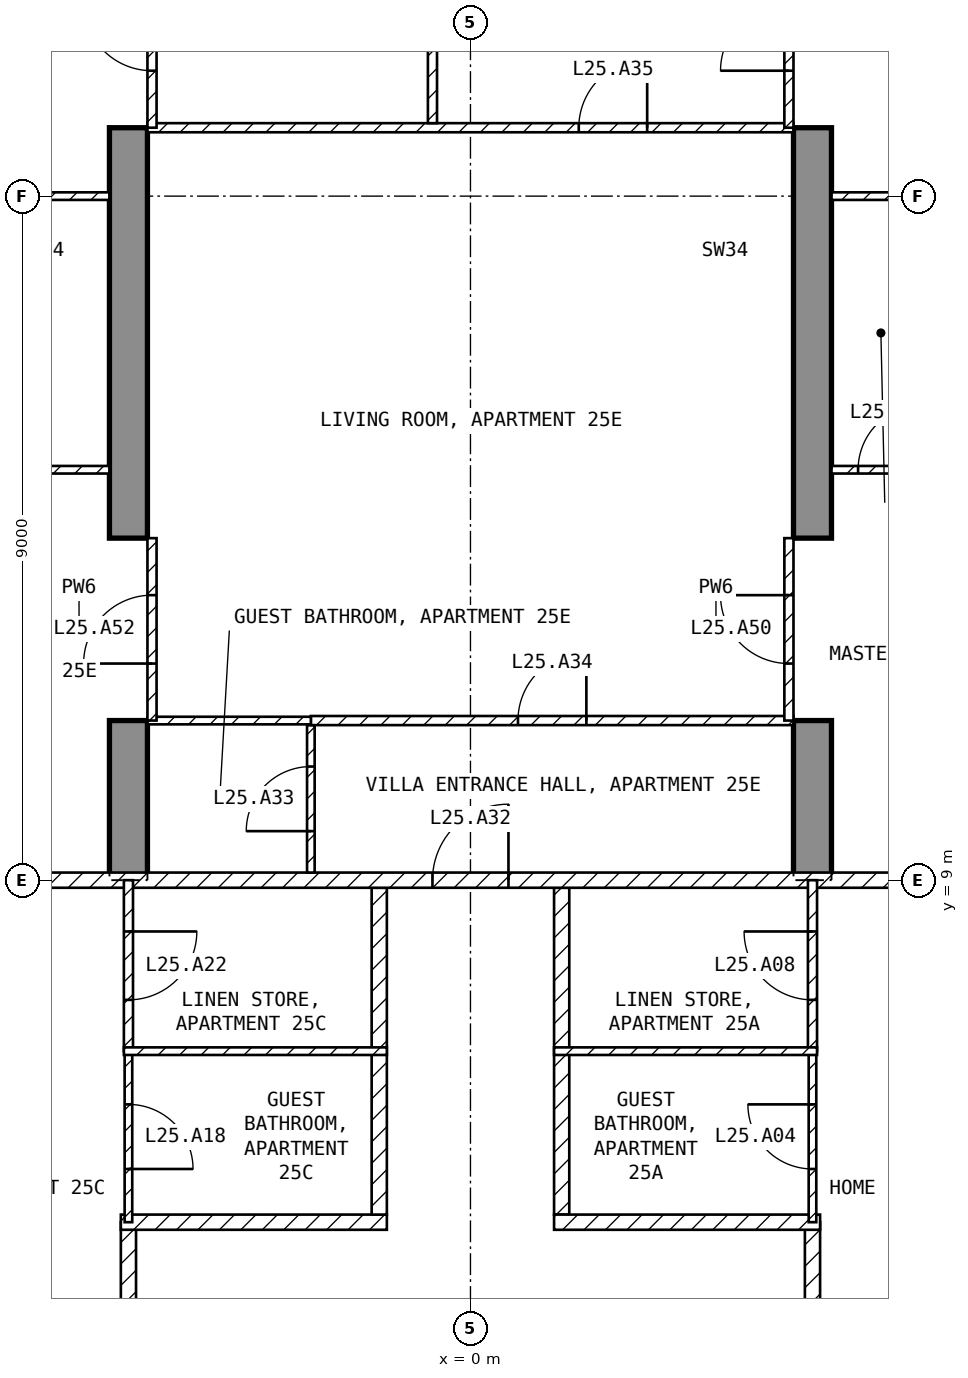
"""IFC4 building model, lengths in metres.
Left out: names, types, materials, properties, quantities, classifications, styles, units other than length and angle.
Written with IfcOpenShell. Run it as: python <this file> out.ifc"""

import sys

from ifc_helpers import new_model, si_unit, direction, frame, frame_2d, origin, place, context, subcontext, project, spatial, polyline, rectangle, outline, extrude, element, fill, save


model = new_model("IFC4")
c1 = context("Model", 3, precision=1e-05, world=origin(), true_north=direction((0.0, 1.0)))
c2 = subcontext(c1, "Body", "Model", "MODEL_VIEW")
j1 = project(units=[si_unit("LENGTHUNIT", "METRE"), si_unit("PLANEANGLEUNIT", "RADIAN")], contexts=[c1])
p1 = place(None, origin())
s1 = spatial("IfcSite", under=j1, at=p1, CompositionType="ELEMENT")
p2 = place(p1, origin())
s2 = spatial("IfcBuilding", under=s1, at=p2, CompositionType="ELEMENT")
p3 = place(p2, frame((0.0, 0.0, 109.4)))
s3 = spatial("IfcBuildingStorey", under=s2, at=p3, CompositionType="ELEMENT", Elevation=109.4)
for number, where, z_axis, x_axis in (
    (1, (-4.75, 9.0, -0.25), (1.0, 0.0, 0.0), (0.0, 1.0, 0.0)),
    (2, (4.25, 9.0, -0.25), (1.0, 0.0, 0.0), (0.0, 1.0, 0.0)),
):
    element("IfcWall", number, at=place(p3, frame(where, z_axis=z_axis, x_axis=x_axis)), inside=s3, PredefinedType="SHEAR", context=c2, shape_type="SweptSolid", body=[
        extrude(outline(polyline([(0.0, 0.0), (2.1, 0.0), (2.1, 2.65), (4.5, 2.65), (4.5, 0.0), (9.9, 0.0), (9.9, 2.65), (12.3, 2.65), (12.3, 0.0), (16.55, 0.0), (16.55, 3.5), (0.0, 3.5), (0.0, 0.0)])), origin(), (0.0, 0.0, 1.0), 0.5),
    ])
p4 = place(p3, frame((4.5, 4.5, 0.0), z_axis=(0.0, 0.0, 1.0), x_axis=(0.0, -1.0, 0.0)))
e3 = element("IfcWall", 3, at=p4, inside=s3, PredefinedType="PARTITIONING", context=c2, shape_type="SweptSolid", body=[
    extrude(rectangle(XDim=3.2, YDim=0.2, at=frame_2d((1.6, 0.0))), origin(), (0.0, 0.0, 1.0), 3.25),
])
p5 = place(p3, frame((1.2, 8.9, 0.0), z_axis=(0.0, 0.0, 1.0), x_axis=(0.0, -1.0, 0.0)))
e4 = element("IfcWall", 4, at=p5, inside=s3, PredefinedType="PARTITIONING", context=c2, shape_type="SweptSolid", body=[
    extrude(rectangle(XDim=4.3, YDim=0.2, at=frame_2d((2.15, 0.0))), origin(), (0.0, 0.0, 1.0), 3.25),
])
p6 = place(p3, frame((1.1, 4.5, 0.0), z_axis=(0.0, 0.0, 1.0), x_axis=(1.0, 0.0, 0.0)))
e5 = element("IfcWall", 5, at=p6, inside=s3, PredefinedType="PARTITIONING", context=c2, shape_type="SweptSolid", body=[
    extrude(rectangle(XDim=3.5, YDim=0.2, at=frame_2d((1.75, 0.0))), origin(), (0.0, 0.0, 1.0), 3.25),
])
p7 = place(p3, frame((-4.5, 1.3, 0.0), z_axis=(0.0, 0.0, 1.0), x_axis=(0.0, 1.0, 0.0)))
e6 = element("IfcWall", 6, at=p7, inside=s3, PredefinedType="PARTITIONING", context=c2, shape_type="SweptSolid", body=[
    extrude(rectangle(XDim=3.2, YDim=0.2, at=frame_2d((1.6, 0.0))), origin(), (0.0, 0.0, 1.0), 3.25),
])
p8 = place(p3, frame((-4.6, 4.5, 0.0), z_axis=(0.0, 0.0, 1.0), x_axis=(1.0, 0.0, 0.0)))
e7 = element("IfcWall", 7, at=p8, inside=s3, PredefinedType="PARTITIONING", context=c2, shape_type="SweptSolid", body=[
    extrude(rectangle(XDim=3.5, YDim=0.2, at=frame_2d((1.75, 0.0))), origin(), (0.0, 0.0, 1.0), 3.25),
])
p9 = place(p3, frame((-1.2, 4.6, 0.0), z_axis=(0.0, 0.0, 1.0), x_axis=(0.0, 1.0, 0.0)))
e8 = element("IfcWall", 8, at=p9, inside=s3, PredefinedType="PARTITIONING", context=c2, shape_type="SweptSolid", body=[
    extrude(rectangle(XDim=4.3, YDim=0.2, at=frame_2d((2.15, 0.0))), origin(), (0.0, 0.0, 1.0), 3.25),
])
p10 = place(p3, frame((-8.92, 9.0, 0.0), z_axis=(0.0, 0.0, 1.0), x_axis=(1.0, 0.0, 0.0)))
e9 = element("IfcWall", 9, at=p10, inside=s3, PredefinedType="PARTITIONING", context=c2, shape_type="SweptSolid", body=[
    extrude(rectangle(XDim=17.84, YDim=0.2, at=frame_2d((8.92, 0.0))), origin(), (0.0, 0.0, 1.0), 3.25),
])
p11 = place(p10, frame((8.42, 0.0, 0.0)))
e10 = element("IfcOpeningElement", 10, at=p11, cuts=e9, PredefinedType="OPENING", context=c2, shape_type="SweptSolid", body=[
    extrude(rectangle(XDim=1.0, YDim=2.1, at=frame_2d((0.5, 1.05))), frame((0.0, 0.11, 0.0), z_axis=(0.0, -1.0, 0.0), x_axis=(1.0, 0.0, 0.0)), (0.0, 0.0, 1.0), 0.22),
])
p12 = place(p3, frame((4.5, 4.5, 0.0), z_axis=(0.0, 0.0, 1.0), x_axis=(0.0, 1.0, 0.0)))
e11 = element("IfcWall", 11, at=p12, inside=s3, PredefinedType="PARTITIONING", context=c2, shape_type="SweptSolid", body=[
    extrude(rectangle(XDim=2.25, YDim=0.1, at=frame_2d((1.125, 0.0))), origin(), (0.0, 0.0, 1.0), 3.25),
])
p13 = place(p12, frame((0.7, 0.0, 0.0)))
e12 = element("IfcOpeningElement", 12, at=p13, cuts=e11, PredefinedType="OPENING", context=c2, shape_type="SweptSolid", body=[
    extrude(rectangle(XDim=0.85, YDim=2.1, at=frame_2d((0.425, 1.05))), frame((0.0, 0.06, 0.0), z_axis=(0.0, -1.0, 0.0), x_axis=(1.0, 0.0, 0.0)), (0.0, 0.0, 1.0), 0.12),
])
p14 = place(p3, frame((4.5, 6.75, 0.0), z_axis=(0.0, 0.0, 1.0), x_axis=(0.0, 1.0, 0.0)))
e13 = element("IfcWall", 13, at=p14, inside=s3, PredefinedType="PARTITIONING", context=c2, shape_type="SweptSolid", body=[
    extrude(rectangle(XDim=2.25, YDim=0.12, at=frame_2d((1.125, 0.0))), origin(), (0.0, 0.0, 1.0), 3.25),
])
p15 = place(p14, frame((0.675, 0.0, 0.0)))
e14 = element("IfcOpeningElement", 14, at=p15, cuts=e13, PredefinedType="OPENING", context=c2, shape_type="SweptSolid", body=[
    extrude(rectangle(XDim=0.9, YDim=2.1, at=frame_2d((0.45, 1.05))), frame((0.0, 0.07, 0.0), z_axis=(0.0, -1.0, 0.0), x_axis=(1.0, 0.0, 0.0)), (0.0, 0.0, 1.0), 0.14),
])
p16 = place(p3, frame((1.1, 6.75, 0.0), z_axis=(0.0, 0.0, 1.0), x_axis=(1.0, 0.0, 0.0)))
e15 = element("IfcWall", 15, at=p16, inside=s3, PredefinedType="PARTITIONING", context=c2, shape_type="SweptSolid", body=[
    extrude(rectangle(XDim=3.46, YDim=0.1, at=frame_2d((1.73, 0.0))), origin(), (0.0, 0.0, 1.0), 3.25),
])
p17 = place(p3, frame((-4.5, 6.75, 0.0), z_axis=(0.0, 0.0, 1.0), x_axis=(0.0, -1.0, 0.0)))
e16 = element("IfcWall", 16, at=p17, inside=s3, PredefinedType="PARTITIONING", context=c2, shape_type="SweptSolid", body=[
    extrude(rectangle(XDim=2.25, YDim=0.1, at=frame_2d((1.125, 0.0))), origin(), (0.0, 0.0, 1.0), 3.25),
])
p18 = place(p17, frame((0.7, 0.0, 0.0)))
e17 = element("IfcOpeningElement", 17, at=p18, cuts=e16, PredefinedType="OPENING", context=c2, shape_type="SweptSolid", body=[
    extrude(rectangle(XDim=0.85, YDim=2.1, at=frame_2d((0.425, 1.05))), frame((0.0, 0.06, 0.0), z_axis=(0.0, -1.0, 0.0), x_axis=(1.0, 0.0, 0.0)), (0.0, 0.0, 1.0), 0.12),
])
p19 = place(p3, frame((-4.5, 9.0, 0.0), z_axis=(0.0, 0.0, 1.0), x_axis=(0.0, -1.0, 0.0)))
e18 = element("IfcWall", 18, at=p19, inside=s3, PredefinedType="PARTITIONING", context=c2, shape_type="SweptSolid", body=[
    extrude(rectangle(XDim=2.25, YDim=0.12, at=frame_2d((1.125, 0.0))), origin(), (0.0, 0.0, 1.0), 3.25),
])
p20 = place(p19, frame((0.675, 0.0, 0.0)))
e19 = element("IfcOpeningElement", 19, at=p20, cuts=e18, PredefinedType="OPENING", context=c2, shape_type="SweptSolid", body=[
    extrude(rectangle(XDim=0.9, YDim=2.1, at=frame_2d((0.45, 1.05))), frame((0.0, 0.07, 0.0), z_axis=(0.0, -1.0, 0.0), x_axis=(1.0, 0.0, 0.0)), (0.0, 0.0, 1.0), 0.14),
])
p21 = place(p3, frame((-4.56, 6.75, 0.0), z_axis=(0.0, 0.0, 1.0), x_axis=(1.0, 0.0, 0.0)))
e20 = element("IfcWall", 20, at=p21, inside=s3, PredefinedType="PARTITIONING", context=c2, shape_type="SweptSolid", body=[
    extrude(rectangle(XDim=3.46, YDim=0.1, at=frame_2d((1.73, 0.0))), origin(), (0.0, 0.0, 1.0), 3.25),
])
p22 = place(p3, frame((-2.1, 9.1, 0.0), z_axis=(0.0, 0.0, 1.0), x_axis=(0.0, 1.0, 0.0)))
e21 = element("IfcWall", 21, at=p22, inside=s3, PredefinedType="PARTITIONING", context=c2, shape_type="SweptSolid", body=[
    extrude(rectangle(XDim=1.94, YDim=0.1, at=frame_2d((0.97, 0.0))), origin(), (0.0, 0.0, 1.0), 3.25),
])
p23 = place(p22, frame((0.545, 0.0, 0.0)))
e22 = element("IfcOpeningElement", 22, at=p23, cuts=e21, PredefinedType="OPENING", context=c2, shape_type="SweptSolid", body=[
    extrude(rectangle(XDim=0.85, YDim=2.1, at=frame_2d((0.425, 1.05))), frame((0.0, 0.06, 0.0), z_axis=(0.0, -1.0, 0.0), x_axis=(1.0, 0.0, 0.0)), (0.0, 0.0, 1.0), 0.12),
])
p24 = place(p3, frame((-2.1, 11.1, 0.0), z_axis=(0.0, 0.0, 1.0), x_axis=(1.0, 0.0, 0.0)))
e23 = element("IfcWall", 23, at=p24, inside=s3, PredefinedType="PARTITIONING", context=c2, shape_type="SweptSolid", body=[
    extrude(rectangle(XDim=6.35, YDim=0.12, at=frame_2d((3.175, 0.0))), origin(), (0.0, 0.0, 1.0), 3.25),
])
p25 = place(p24, frame((2.725, 0.0, 0.0)))
e24 = element("IfcOpeningElement", 24, at=p25, cuts=e23, PredefinedType="OPENING", context=c2, shape_type="SweptSolid", body=[
    extrude(rectangle(XDim=0.9, YDim=2.1, at=frame_2d((0.45, 1.05))), frame((0.0, 0.07, 0.0), z_axis=(0.0, -1.0, 0.0), x_axis=(1.0, 0.0, 0.0)), (0.0, 0.0, 1.0), 0.14),
])
p26 = place(p3, frame((-4.25, 11.1, 0.0), z_axis=(0.0, 0.0, 1.0), x_axis=(1.0, 0.0, 0.0)))
e25 = element("IfcWall", 25, at=p26, inside=s3, PredefinedType="PARTITIONING", context=c2, shape_type="SweptSolid", body=[
    extrude(rectangle(XDim=2.15, YDim=0.1, at=frame_2d((1.075, 0.0))), origin(), (0.0, 0.0, 1.0), 3.25),
])
p27 = place(p3, frame((-4.25, 18.9, 0.0), z_axis=(0.0, 0.0, 1.0), x_axis=(1.0, 0.0, 0.0)))
e26 = element("IfcWall", 26, at=p27, inside=s3, PredefinedType="PARTITIONING", context=c2, shape_type="SweptSolid", body=[
    extrude(rectangle(XDim=8.5, YDim=0.12, at=frame_2d((4.25, 0.0))), origin(), (0.0, 0.0, 1.0), 3.25),
])
p28 = place(p27, frame((5.675, 0.0, 0.0)))
e27 = element("IfcOpeningElement", 27, at=p28, cuts=e26, PredefinedType="OPENING", context=c2, shape_type="SweptSolid", body=[
    extrude(rectangle(XDim=0.9, YDim=2.1, at=frame_2d((0.45, 1.05))), frame((0.0, 0.07, 0.0), z_axis=(0.0, -1.0, 0.0), x_axis=(1.0, 0.0, 0.0)), (0.0, 0.0, 1.0), 0.14),
])
p29 = place(p3, frame((-0.5, 18.96, 0.0), z_axis=(0.0, 0.0, 1.0), x_axis=(0.0, 1.0, 0.0)))
e28 = element("IfcWall", 28, at=p29, inside=s3, PredefinedType="PARTITIONING", context=c2, shape_type="SweptSolid", body=[
    extrude(rectangle(XDim=4.38, YDim=0.12, at=frame_2d((2.19, 0.0))), origin(), (0.0, 0.0, 1.0), 3.25),
])
p30 = place(p29, frame((1.74, 0.0, 0.0)))
e29 = element("IfcOpeningElement", 29, at=p30, cuts=e28, PredefinedType="OPENING", context=c2, shape_type="SweptSolid", body=[
    extrude(rectangle(XDim=0.9, YDim=2.1, at=frame_2d((0.45, 1.05))), frame((0.0, 0.07, 0.0), z_axis=(0.0, -1.0, 0.0), x_axis=(1.0, 0.0, 0.0)), (0.0, 0.0, 1.0), 0.14),
])
p31 = place(p3, frame((4.75, 14.4, 0.0), z_axis=(0.0, 0.0, 1.0), x_axis=(1.0, 0.0, 0.0)))
e30 = element("IfcWall", 30, at=p31, inside=s3, PredefinedType="PARTITIONING", context=c2, shape_type="SweptSolid", body=[
    extrude(rectangle(XDim=1.6, YDim=0.1, at=frame_2d((0.8, 0.0))), origin(), (0.0, 0.0, 1.0), 3.25),
])
p32 = place(p31, frame((0.35, 0.0, 0.0)))
e31 = element("IfcOpeningElement", 31, at=p32, cuts=e30, PredefinedType="OPENING", context=c2, shape_type="SweptSolid", body=[
    extrude(rectangle(XDim=0.85, YDim=2.1, at=frame_2d((0.425, 1.05))), frame((0.0, 0.06, 0.0), z_axis=(0.0, -1.0, 0.0), x_axis=(1.0, 0.0, 0.0)), (0.0, 0.0, 1.0), 0.12),
])
p33 = place(p3, frame((4.75, 18.0, 0.0), z_axis=(0.0, 0.0, 1.0), x_axis=(1.0, 0.0, 0.0)))
e32 = element("IfcWall", 32, at=p33, inside=s3, PredefinedType="PARTITIONING", context=c2, shape_type="SweptSolid", body=[
    extrude(rectangle(XDim=1.55, YDim=0.1, at=frame_2d((0.775, 0.0))), origin(), (0.0, 0.0, 1.0), 2.414),
])
p34 = place(p3, frame((-6.95, 14.4, 0.0), z_axis=(0.0, 0.0, 1.0), x_axis=(1.0, 0.0, 0.0)))
e33 = element("IfcWall", 33, at=p34, inside=s3, PredefinedType="PARTITIONING", context=c2, shape_type="SweptSolid", body=[
    extrude(rectangle(XDim=2.2, YDim=0.1, at=frame_2d((1.1, 0.0))), origin(), (0.0, 0.0, 1.0), 3.25),
])
p35 = place(p3, frame((-6.9, 18.0, 0.0), z_axis=(0.0, 0.0, 1.0), x_axis=(1.0, 0.0, 0.0)))
e34 = element("IfcWall", 34, at=p35, inside=s3, PredefinedType="PARTITIONING", context=c2, shape_type="SweptSolid", body=[
    extrude(rectangle(XDim=2.15, YDim=0.1, at=frame_2d((1.075, 0.0))), origin(), (0.0, 0.0, 1.0), 2.414),
])
p36 = place(p3, frame((4.19, 11.1, 0.0), z_axis=(0.0, 0.0, 1.0), x_axis=(0.0, 1.0, 0.0)))
e35 = element("IfcWall", 35, at=p36, inside=s3, PredefinedType="PARTITIONING", context=c2, shape_type="SweptSolid", body=[
    extrude(rectangle(XDim=2.4, YDim=0.12, at=frame_2d((1.2, 0.0))), origin(), (0.0, 0.0, 1.0), 2.4),
])
p37 = place(p36, frame((0.75, 0.0, 0.0)))
e36 = element("IfcOpeningElement", 36, at=p37, cuts=e35, PredefinedType="OPENING", context=c2, shape_type="SweptSolid", body=[
    extrude(rectangle(XDim=0.9, YDim=2.1, at=frame_2d((0.45, 1.05))), frame((0.0, 0.07, 0.0), z_axis=(0.0, -1.0, 0.0), x_axis=(1.0, 0.0, 0.0)), (0.0, 0.0, 1.0), 0.14),
])
p38 = place(p3, frame((4.19, 18.9, 0.0), z_axis=(0.0, 0.0, 1.0), x_axis=(0.0, 1.0, 0.0)))
e37 = element("IfcWall", 37, at=p38, inside=s3, PredefinedType="PARTITIONING", context=c2, shape_type="SweptSolid", body=[
    extrude(rectangle(XDim=2.4, YDim=0.12, at=frame_2d((1.2, 0.0))), origin(), (0.0, 0.0, 1.0), 2.4),
])
p39 = place(p38, frame((0.75, 0.0, 0.0)))
e38 = element("IfcOpeningElement", 38, at=p39, cuts=e37, PredefinedType="OPENING", context=c2, shape_type="SweptSolid", body=[
    extrude(rectangle(XDim=0.9, YDim=2.1, at=frame_2d((0.45, 1.05))), frame((0.0, 0.07, 0.0), z_axis=(0.0, -1.0, 0.0), x_axis=(1.0, 0.0, 0.0)), (0.0, 0.0, 1.0), 0.14),
])
p40 = place(p3, frame((-4.19, 11.1, 0.0), z_axis=(0.0, 0.0, 1.0), x_axis=(0.0, 1.0, 0.0)))
e39 = element("IfcWall", 39, at=p40, inside=s3, PredefinedType="PARTITIONING", context=c2, shape_type="SweptSolid", body=[
    extrude(rectangle(XDim=2.4, YDim=0.12, at=frame_2d((1.2, 0.0))), origin(), (0.0, 0.0, 1.0), 2.4),
])
p41 = place(p40, frame((0.75, 0.0, 0.0)))
e40 = element("IfcOpeningElement", 40, at=p41, cuts=e39, PredefinedType="OPENING", context=c2, shape_type="SweptSolid", body=[
    extrude(rectangle(XDim=0.9, YDim=2.1, at=frame_2d((0.45, 1.05))), frame((0.0, 0.07, 0.0), z_axis=(0.0, -1.0, 0.0), x_axis=(1.0, 0.0, 0.0)), (0.0, 0.0, 1.0), 0.14),
])
p42 = place(p3, frame((-4.19, 18.9, 0.0), z_axis=(0.0, 0.0, 1.0), x_axis=(0.0, 1.0, 0.0)))
e41 = element("IfcWall", 41, at=p42, inside=s3, PredefinedType="PARTITIONING", context=c2, shape_type="SweptSolid", body=[
    extrude(rectangle(XDim=2.4, YDim=0.12, at=frame_2d((1.2, 0.0))), origin(), (0.0, 0.0, 1.0), 2.4),
])
p43 = place(p42, frame((0.75, 0.0, 0.0)))
e42 = element("IfcOpeningElement", 42, at=p43, cuts=e41, PredefinedType="OPENING", context=c2, shape_type="SweptSolid", body=[
    extrude(rectangle(XDim=0.9, YDim=2.1, at=frame_2d((0.45, 1.05))), frame((0.0, 0.07, 0.0), z_axis=(0.0, -1.0, 0.0), x_axis=(1.0, 0.0, 0.0)), (0.0, 0.0, 1.0), 0.14),
])
p44 = place(p13, origin())
e43 = element("IfcDoor", 43, at=p44, inside=s3, OperationType="SINGLE_SWING_RIGHT", PredefinedType="DOOR", context=c2, shape_type="SweptSolid", body=[
    extrude(rectangle(XDim=0.85, YDim=2.1, at=frame_2d((0.425, 1.05))), frame((0.0, 0.025, 0.0), z_axis=(0.0, -1.0, 0.0), x_axis=(1.0, 0.0, 0.0)), (0.0, 0.0, 1.0), 0.05),
])
fill(e12, e43)
p45 = place(p15, origin())
e44 = element("IfcDoor", 44, at=p45, inside=s3, OperationType="SINGLE_SWING_RIGHT", PredefinedType="DOOR", context=c2, shape_type="SweptSolid", body=[
    extrude(rectangle(XDim=0.9, YDim=2.1, at=frame_2d((0.45, 1.05))), frame((0.0, 0.025, 0.0), z_axis=(0.0, -1.0, 0.0), x_axis=(1.0, 0.0, 0.0)), (0.0, 0.0, 1.0), 0.05),
])
fill(e14, e44)
p46 = place(p18, origin())
e45 = element("IfcDoor", 45, at=p46, inside=s3, OperationType="SINGLE_SWING_RIGHT", PredefinedType="DOOR", context=c2, shape_type="SweptSolid", body=[
    extrude(rectangle(XDim=0.85, YDim=2.1, at=frame_2d((0.425, 1.05))), frame((0.0, 0.025, 0.0), z_axis=(0.0, -1.0, 0.0), x_axis=(1.0, 0.0, 0.0)), (0.0, 0.0, 1.0), 0.05),
])
fill(e17, e45)
p47 = place(p20, origin())
e46 = element("IfcDoor", 46, at=p47, inside=s3, OperationType="SINGLE_SWING_LEFT", PredefinedType="DOOR", context=c2, shape_type="SweptSolid", body=[
    extrude(rectangle(XDim=0.9, YDim=2.1, at=frame_2d((0.45, 1.05))), frame((0.0, 0.025, 0.0), z_axis=(0.0, -1.0, 0.0), x_axis=(1.0, 0.0, 0.0)), (0.0, 0.0, 1.0), 0.05),
])
fill(e19, e46)
p48 = place(p11, origin())
e47 = element("IfcDoor", 47, at=p48, inside=s3, OperationType="SINGLE_SWING_RIGHT", PredefinedType="DOOR", context=c2, shape_type="SweptSolid", body=[
    extrude(rectangle(XDim=1.0, YDim=2.1, at=frame_2d((0.5, 1.05))), frame((0.0, 0.025, 0.0), z_axis=(0.0, -1.0, 0.0), x_axis=(1.0, 0.0, 0.0)), (0.0, 0.0, 1.0), 0.05),
])
fill(e10, e47)
p49 = place(p23, origin())
e48 = element("IfcDoor", 48, at=p49, inside=s3, OperationType="SINGLE_SWING_LEFT", PredefinedType="DOOR", context=c2, shape_type="SweptSolid", body=[
    extrude(rectangle(XDim=0.85, YDim=2.1, at=frame_2d((0.425, 1.05))), frame((0.0, 0.025, 0.0), z_axis=(0.0, -1.0, 0.0), x_axis=(1.0, 0.0, 0.0)), (0.0, 0.0, 1.0), 0.05),
])
fill(e22, e48)
p50 = place(p25, origin())
e49 = element("IfcDoor", 49, at=p50, inside=s3, OperationType="SINGLE_SWING_RIGHT", PredefinedType="DOOR", context=c2, shape_type="SweptSolid", body=[
    extrude(rectangle(XDim=0.9, YDim=2.1, at=frame_2d((0.45, 1.05))), frame((0.0, 0.025, 0.0), z_axis=(0.0, -1.0, 0.0), x_axis=(1.0, 0.0, 0.0)), (0.0, 0.0, 1.0), 0.05),
])
fill(e24, e49)
p51 = place(p28, origin())
e50 = element("IfcDoor", 50, at=p51, inside=s3, OperationType="SINGLE_SWING_RIGHT", PredefinedType="DOOR", context=c2, shape_type="SweptSolid", body=[
    extrude(rectangle(XDim=0.9, YDim=2.1, at=frame_2d((0.45, 1.05))), frame((0.0, 0.025, 0.0), z_axis=(0.0, -1.0, 0.0), x_axis=(1.0, 0.0, 0.0)), (0.0, 0.0, 1.0), 0.05),
])
fill(e27, e50)
p52 = place(p32, origin())
e51 = element("IfcDoor", 51, at=p52, inside=s3, OperationType="SINGLE_SWING_RIGHT", PredefinedType="DOOR", context=c2, shape_type="SweptSolid", body=[
    extrude(rectangle(XDim=0.85, YDim=2.1, at=frame_2d((0.425, 1.05))), frame((0.0, 0.025, 0.0), z_axis=(0.0, -1.0, 0.0), x_axis=(1.0, 0.0, 0.0)), (0.0, 0.0, 1.0), 0.05),
])
fill(e31, e51)
p53 = place(p37, origin())
e52 = element("IfcDoor", 52, at=p53, inside=s3, OperationType="SINGLE_SWING_RIGHT", PredefinedType="DOOR", context=c2, shape_type="SweptSolid", body=[
    extrude(rectangle(XDim=0.9, YDim=2.1, at=frame_2d((0.45, 1.05))), frame((0.0, 0.025, 0.0), z_axis=(0.0, -1.0, 0.0), x_axis=(1.0, 0.0, 0.0)), (0.0, 0.0, 1.0), 0.05),
])
fill(e36, e52)
p54 = place(p39, origin())
e53 = element("IfcDoor", 53, at=p54, inside=s3, OperationType="SINGLE_SWING_LEFT", PredefinedType="DOOR", context=c2, shape_type="SweptSolid", body=[
    extrude(rectangle(XDim=0.9, YDim=2.1, at=frame_2d((0.45, 1.05))), frame((0.0, 0.025, 0.0), z_axis=(0.0, -1.0, 0.0), x_axis=(1.0, 0.0, 0.0)), (0.0, 0.0, 1.0), 0.05),
])
fill(e38, e53)
p55 = place(p41, origin())
e54 = element("IfcDoor", 54, at=p55, inside=s3, OperationType="SINGLE_SWING_LEFT", PredefinedType="DOOR", context=c2, shape_type="SweptSolid", body=[
    extrude(rectangle(XDim=0.9, YDim=2.1, at=frame_2d((0.45, 1.05))), frame((0.0, 0.025, 0.0), z_axis=(0.0, -1.0, 0.0), x_axis=(1.0, 0.0, 0.0)), (0.0, 0.0, 1.0), 0.05),
])
fill(e40, e54)
p56 = place(p43, origin())
e55 = element("IfcDoor", 55, at=p56, inside=s3, OperationType="SINGLE_SWING_RIGHT", PredefinedType="DOOR", context=c2, shape_type="SweptSolid", body=[
    extrude(rectangle(XDim=0.9, YDim=2.1, at=frame_2d((0.45, 1.05))), frame((0.0, 0.025, 0.0), z_axis=(0.0, -1.0, 0.0), x_axis=(1.0, 0.0, 0.0)), (0.0, 0.0, 1.0), 0.05),
])
fill(e42, e55)
save(model, sys.argv[1])
